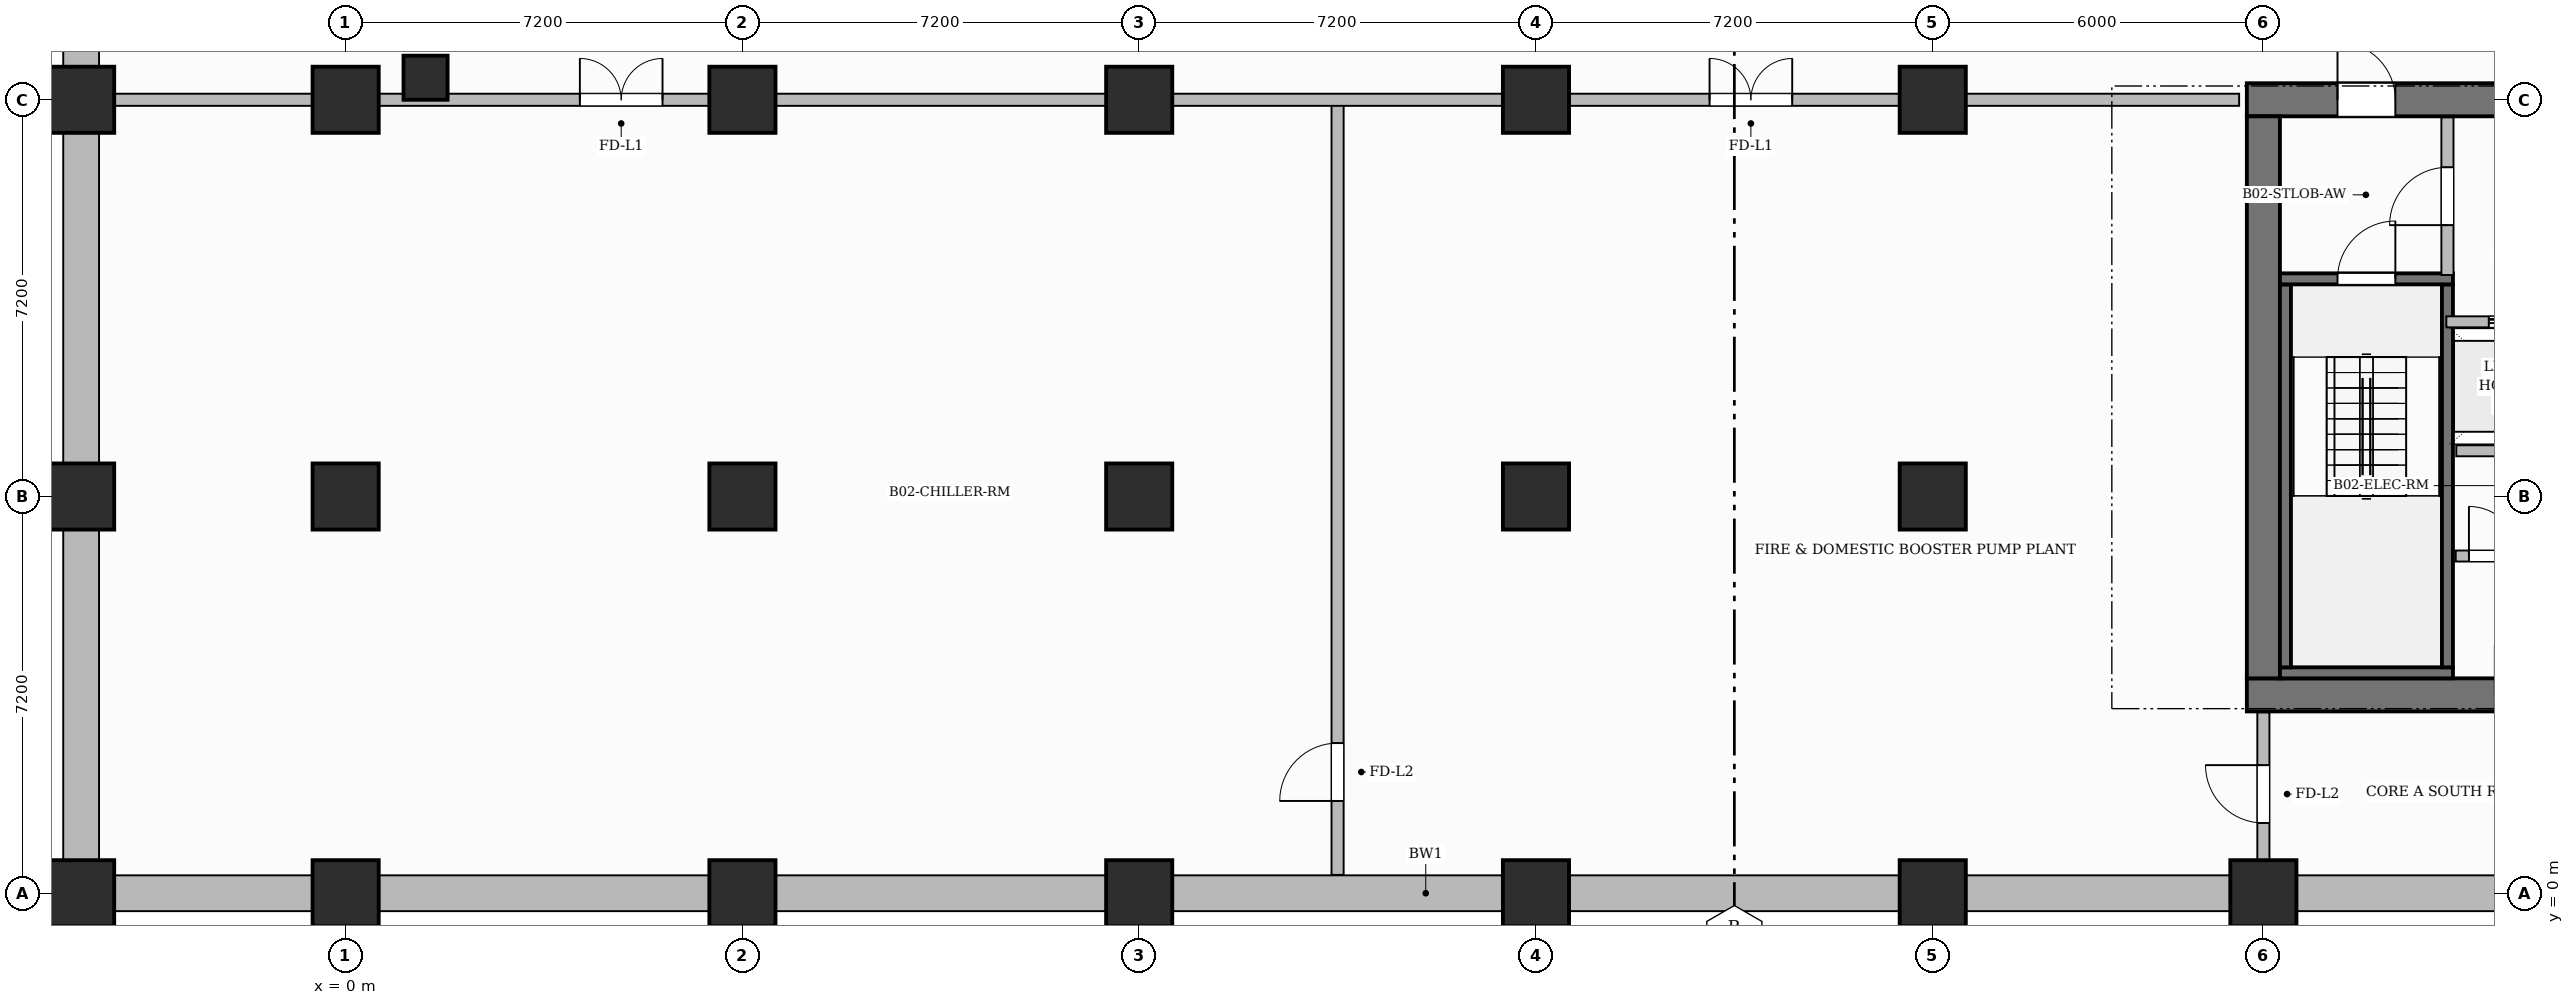
"""IFC4 building model, lengths in metres.
Left out: names, types, materials, properties, quantities, classifications, styles, units other than length and angle.
Written with IfcOpenShell. Run it as: python <this file> out.ifc"""

import sys

from ifc_helpers import new_model, si_unit, direction, frame, frame_2d, origin, origin_2d, place, context, subcontext, project, spatial, rectangle, extrude, source, transform, mapped, element, fill, save


model = new_model("IFC4")
c1 = context("Model", 3, precision=1e-05, world=origin(), true_north=direction((0.0, 1.0)))
c2 = subcontext(c1, "Body", "Model", "MODEL_VIEW")
j1 = project(units=[si_unit("LENGTHUNIT", "METRE"), si_unit("PLANEANGLEUNIT", "RADIAN")], contexts=[c1])
p1 = place(None, origin())
s1 = spatial("IfcSite", under=j1, at=p1, CompositionType="ELEMENT")
p2 = place(p1, origin())
s2 = spatial("IfcBuilding", under=s1, at=p2, CompositionType="ELEMENT")
p3 = place(p2, frame((0.0, 0.0, -13.0)))
s3 = spatial("IfcBuildingStorey", under=s2, at=p3, CompositionType="ELEMENT", Elevation=-13.0)
p4 = place(p3, frame((-4.8, 0.0, -0.4), z_axis=(0.0, 0.0, 1.0), x_axis=(1.0, 0.0, 0.0)))
e1 = element("IfcWall", 1, at=p4, inside=s3, PredefinedType="USERDEFINED", context=c2, shape_type="SweptSolid", body=[
    extrude(rectangle(XDim=85.2, YDim=0.65, at=frame_2d((42.6, 0.0))), origin(), (0.0, 0.0, 1.0), 6.9),
])
p5 = place(p3, frame((-4.8, 46.45, -0.4), z_axis=(0.0, 0.0, 1.0), x_axis=(0.0, -1.0, 0.0)))
e2 = element("IfcWall", 2, at=p5, inside=s3, PredefinedType="USERDEFINED", context=c2, shape_type="SweptSolid", body=[
    extrude(rectangle(XDim=46.1, YDim=0.65, at=frame_2d((23.05, 0.0))), origin(), (0.0, 0.0, 1.0), 6.9),
])
p6 = place(p3, frame((34.5, 3.6, -0.4), z_axis=(0.0, 0.0, 1.0), x_axis=(1.0, 0.0, 0.0)))
e3 = element("IfcWall", 3, at=p6, inside=s3, PredefinedType="SHEAR", context=c2, shape_type="SweptSolid", body=[
    extrude(rectangle(XDim=15.6, YDim=0.6, at=frame_2d((7.8, 0.0))), origin(), (0.0, 0.0, 1.0), 6.9),
])
p7 = place(p6, frame((4.5, 0.0, 0.4)))
e4 = element("IfcOpeningElement", 4, at=p7, cuts=e3, PredefinedType="OPENING", context=c2, shape_type="SweptSolid", body=[
    extrude(rectangle(XDim=0.9, YDim=2.1, at=frame_2d((0.45, 1.05))), frame((0.0, 0.31, 0.0), z_axis=(0.0, -1.0, 0.0), x_axis=(1.0, 0.0, 0.0)), (0.0, 0.0, 1.0), 0.62),
])
p8 = place(p6, frame((6.95, 0.0, 0.4)))
e5 = element("IfcOpeningElement", 5, at=p8, cuts=e3, PredefinedType="OPENING", context=c2, shape_type="SweptSolid", body=[
    extrude(rectangle(XDim=0.9, YDim=2.1, at=frame_2d((0.45, 1.05))), frame((0.0, 0.31, 0.0), z_axis=(0.0, -1.0, 0.0), x_axis=(1.0, 0.0, 0.0)), (0.0, 0.0, 1.0), 0.62),
])
p9 = place(p3, frame((34.5, 14.4, -0.4), z_axis=(0.0, 0.0, 1.0), x_axis=(1.0, 0.0, 0.0)))
e6 = element("IfcWall", 6, at=p9, inside=s3, PredefinedType="SHEAR", context=c2, shape_type="SweptSolid", body=[
    extrude(rectangle(XDim=15.6, YDim=0.6, at=frame_2d((7.8, 0.0))), origin(), (0.0, 0.0, 1.0), 6.9),
])
p10 = place(p9, frame((5.43, 0.0, 0.4)))
e7 = element("IfcOpeningElement", 7, at=p10, cuts=e6, PredefinedType="OPENING", context=c2, shape_type="SweptSolid", body=[
    extrude(rectangle(XDim=1.5, YDim=2.2, at=frame_2d((0.75, 1.1))), frame((0.0, 0.31, 0.0), z_axis=(0.0, -1.0, 0.0), x_axis=(1.0, 0.0, 0.0)), (0.0, 0.0, 1.0), 0.62),
])
p11 = place(p9, frame((1.645, 0.0, 0.4)))
e8 = element("IfcOpeningElement", 8, at=p11, cuts=e6, PredefinedType="OPENING", context=c2, shape_type="SweptSolid", body=[
    extrude(rectangle(XDim=1.05, YDim=2.15, at=frame_2d((0.525, 1.075))), frame((0.0, 0.31, 0.0), z_axis=(0.0, -1.0, 0.0), x_axis=(1.0, 0.0, 0.0)), (0.0, 0.0, 1.0), 0.62),
])
p12 = place(p9, frame((11.275, 0.0, 0.4)))
e9 = element("IfcOpeningElement", 9, at=p12, cuts=e6, PredefinedType="OPENING", context=c2, shape_type="SweptSolid", body=[
    extrude(rectangle(XDim=1.05, YDim=2.15, at=frame_2d((0.525, 1.075))), frame((0.0, 0.31, 0.0), z_axis=(0.0, -1.0, 0.0), x_axis=(1.0, 0.0, 0.0)), (0.0, 0.0, 1.0), 0.62),
])
p13 = place(p3, frame((34.8, 3.9, -0.4), z_axis=(0.0, 0.0, 1.0), x_axis=(0.0, 1.0, 0.0)))
e10 = element("IfcWall", 10, at=p13, inside=s3, PredefinedType="SHEAR", context=c2, shape_type="SweptSolid", body=[
    extrude(rectangle(XDim=10.2, YDim=0.6, at=frame_2d((5.1, 0.0))), origin(), (0.0, 0.0, 1.0), 6.9),
])
m1 = source(origin(), c2, "Body", "SweptSolid", [
    extrude(rectangle(XDim=1.2, YDim=1.2, at=origin_2d()), origin(), (0.0, 0.0, 1.0), 6.9),
])
for number, where, z_axis, x_axis in (
    (11, (-4.8, 0.0, -0.4), (0.0, 0.0, 1.0), (1.0, 0.0, 0.0)),
    (12, (-4.8, 7.2, -0.4), (0.0, 0.0, 1.0), (1.0, 0.0, 0.0)),
    (13, (-4.8, 14.4, -0.4), (0.0, 0.0, 1.0), (1.0, 0.0, 0.0)),
    (14, (0.0, 0.0, -0.4), (0.0, 0.0, 1.0), (1.0, 0.0, 0.0)),
    (15, (0.0, 7.2, -0.4), (0.0, 0.0, 1.0), (1.0, 0.0, 0.0)),
    (16, (0.0, 14.4, -0.4), (0.0, 0.0, 1.0), (1.0, 0.0, 0.0)),
    (17, (7.2, 0.0, -0.4), (0.0, 0.0, 1.0), (1.0, 0.0, 0.0)),
    (18, (7.2, 7.2, -0.4), (0.0, 0.0, 1.0), (1.0, 0.0, 0.0)),
    (19, (7.2, 14.4, -0.4), (0.0, 0.0, 1.0), (1.0, 0.0, 0.0)),
    (20, (14.4, 0.0, -0.4), (0.0, 0.0, 1.0), (1.0, 0.0, 0.0)),
    (21, (14.4, 7.2, -0.4), (0.0, 0.0, 1.0), (1.0, 0.0, 0.0)),
    (22, (14.4, 14.4, -0.4), (0.0, 0.0, 1.0), (1.0, 0.0, 0.0)),
    (23, (21.6, 0.0, -0.4), (0.0, 0.0, 1.0), (1.0, 0.0, 0.0)),
    (24, (21.6, 7.2, -0.4), (0.0, 0.0, 1.0), (1.0, 0.0, 0.0)),
    (25, (21.6, 14.4, -0.4), (0.0, 0.0, 1.0), (1.0, 0.0, 0.0)),
    (26, (28.8, 0.0, -0.4), (0.0, 0.0, 1.0), (1.0, 0.0, 0.0)),
    (27, (28.8, 7.2, -0.4), (0.0, 0.0, 1.0), (1.0, 0.0, 0.0)),
    (28, (28.8, 14.4, -0.4), (0.0, 0.0, 1.0), (1.0, 0.0, 0.0)),
    (29, (34.8, 0.0, -0.4), (0.0, 0.0, 1.0), (1.0, 0.0, 0.0)),
):
    element("IfcColumn", number, at=place(p3, frame(where, z_axis=z_axis, x_axis=x_axis)), inside=s3, PredefinedType="COLUMN", context=c2, shape_type="MappedRepresentation", body=[
        mapped(m1, transform((0.0, 0.0, 0.0), scale=1.0)),
    ])
m2 = source(origin(), c2, "Body", "SweptSolid", [
    extrude(rectangle(XDim=0.8, YDim=0.8, at=origin_2d()), origin(), (0.0, 0.0, 1.0), 6.9),
])
p14 = place(p3, frame((1.45, 14.8, -0.4), z_axis=(0.0, 0.0, 1.0), x_axis=(1.0, 0.0, 0.0)))
e30 = element("IfcColumn", 30, at=p14, inside=s3, PredefinedType="COLUMN", context=c2, shape_type="MappedRepresentation", body=[
    mapped(m2, transform((0.0, 0.0, 0.0), scale=1.0)),
])
p15 = place(p3, frame((35.1, 4.0, -0.4), z_axis=(0.0, 0.0, 1.0), x_axis=(1.0, 0.0, 0.0)))
e31 = element("IfcWall", 31, at=p15, inside=s3, PredefinedType="SHEAR", context=c2, shape_type="SweptSolid", body=[
    extrude(rectangle(XDim=3.14, YDim=0.2, at=frame_2d((1.57, 0.0))), origin(), (0.0, 0.0, 1.0), 6.9),
])
for number, where, z_axis, x_axis in (
    (32, (35.2, 4.1, -0.4), (0.0, 0.0, 1.0), (0.0, 1.0, 0.0)),
    (33, (38.14, 4.1, -0.4), (0.0, 0.0, 1.0), (0.0, 1.0, 0.0)),
):
    element("IfcWall", number, at=place(p3, frame(where, z_axis=z_axis, x_axis=x_axis)), inside=s3, PredefinedType="SHEAR", context=c2, shape_type="SweptSolid", body=[
        extrude(rectangle(XDim=6.95, YDim=0.2, at=frame_2d((3.475, 0.0))), origin(), (0.0, 0.0, 1.0), 6.9),
    ])
p16 = place(p3, frame((35.1, 11.15, -0.4), z_axis=(0.0, 0.0, 1.0), x_axis=(1.0, 0.0, 0.0)))
e34 = element("IfcWall", 34, at=p16, inside=s3, PredefinedType="SHEAR", context=c2, shape_type="SweptSolid", body=[
    extrude(rectangle(XDim=3.14, YDim=0.2, at=frame_2d((1.57, 0.0))), origin(), (0.0, 0.0, 1.0), 6.9),
])
p17 = place(p16, frame((1.045, 0.0, 0.4)))
e35 = element("IfcOpeningElement", 35, at=p17, cuts=e34, PredefinedType="OPENING", context=c2, shape_type="SweptSolid", body=[
    extrude(rectangle(XDim=1.05, YDim=2.2, at=frame_2d((0.525, 1.1))), frame((0.0, 0.11, 0.0), z_axis=(0.0, -1.0, 0.0), x_axis=(1.0, 0.0, 0.0)), (0.0, 0.0, 1.0), 0.22),
])
p18 = place(p3, frame((38.3, 8.03, 0.0), z_axis=(0.0, 0.0, 1.0), x_axis=(1.0, 0.0, 0.0)))
e36 = element("IfcWall", 36, at=p18, inside=s3, PredefinedType="PARTITIONING", context=c2, shape_type="SweptSolid", body=[
    extrude(rectangle(XDim=4.74, YDim=0.2, at=frame_2d((2.37, 0.0))), origin(), (0.0, 0.0, 1.0), 6.1),
])
p19 = place(p3, frame((38.14, 11.22, 0.0), z_axis=(0.0, 0.0, 1.0), x_axis=(0.0, 1.0, 0.0)))
e37 = element("IfcWall", 37, at=p19, inside=s3, PredefinedType="PARTITIONING", context=c2, shape_type="SweptSolid", body=[
    extrude(rectangle(XDim=2.86, YDim=0.22, at=frame_2d((1.43, 0.0))), origin(), (0.0, 0.0, 1.0), 6.1),
])
p20 = place(p19, frame((0.905, 0.0, 0.0)))
e38 = element("IfcOpeningElement", 38, at=p20, cuts=e37, PredefinedType="OPENING", context=c2, shape_type="SweptSolid", body=[
    extrude(rectangle(XDim=1.05, YDim=2.15, at=frame_2d((0.525, 1.075))), frame((0.0, 0.12, 0.0), z_axis=(0.0, -1.0, 0.0), x_axis=(1.0, 0.0, 0.0)), (0.0, 0.0, 1.0), 0.24),
])
p21 = place(p3, frame((38.29, 6.12, 0.0), z_axis=(0.0, 0.0, 1.0), x_axis=(1.0, 0.0, 0.0)))
e39 = element("IfcWall", 39, at=p21, inside=s3, PredefinedType="PARTITIONING", context=c2, shape_type="SweptSolid", body=[
    extrude(rectangle(XDim=1.38, YDim=0.2, at=frame_2d((0.69, 0.0))), origin(), (0.0, 0.0, 1.0), 6.1),
])
p22 = place(p21, frame((0.24, 0.0, 0.0)))
e40 = element("IfcOpeningElement", 40, at=p22, cuts=e39, PredefinedType="OPENING", context=c2, shape_type="SweptSolid", body=[
    extrude(rectangle(XDim=0.9, YDim=2.1, at=frame_2d((0.45, 1.05))), frame((0.0, 0.11, 0.0), z_axis=(0.0, -1.0, 0.0), x_axis=(1.0, 0.0, 0.0)), (0.0, 0.0, 1.0), 0.22),
])
p23 = place(p3, frame((18.0, 0.333, 0.0), z_axis=(0.0, 0.0, 1.0), x_axis=(0.0, 1.0, 0.0)))
e41 = element("IfcWall", 41, at=p23, inside=s3, PredefinedType="PARTITIONING", context=c2, shape_type="SweptSolid", body=[
    extrude(rectangle(XDim=13.977, YDim=0.22, at=frame_2d((6.989, 0.0))), origin(), (0.0, 0.0, 1.0), 5.335),
])
p24 = place(p23, frame((1.342, 0.0, 0.0)))
e42 = element("IfcOpeningElement", 42, at=p24, cuts=e41, PredefinedType="OPENING", context=c2, shape_type="SweptSolid", body=[
    extrude(rectangle(XDim=1.05, YDim=2.15, at=frame_2d((0.525, 1.075))), frame((0.0, 0.12, 0.0), z_axis=(0.0, -1.0, 0.0), x_axis=(1.0, 0.0, 0.0)), (0.0, 0.0, 1.0), 0.24),
])
p25 = place(p3, frame((-4.31, 14.4, 0.0), z_axis=(0.0, 0.0, 1.0), x_axis=(1.0, 0.0, 0.0)))
e43 = element("IfcWall", 43, at=p25, inside=s3, PredefinedType="PARTITIONING", context=c2, shape_type="SweptSolid", body=[
    extrude(rectangle(XDim=38.67, YDim=0.22, at=frame_2d((19.335, 0.0))), origin(), (0.0, 0.0, 1.0), 5.185),
])
p26 = place(p25, frame((8.56, 0.0, 0.0)))
e44 = element("IfcOpeningElement", 44, at=p26, cuts=e43, PredefinedType="OPENING", context=c2, shape_type="SweptSolid", body=[
    extrude(rectangle(XDim=1.5, YDim=2.2, at=frame_2d((0.75, 1.1))), frame((0.0, 0.12, 0.0), z_axis=(0.0, -1.0, 0.0), x_axis=(1.0, 0.0, 0.0)), (0.0, 0.0, 1.0), 0.24),
])
p27 = place(p25, frame((29.06, 0.0, 0.0)))
e45 = element("IfcOpeningElement", 45, at=p27, cuts=e43, PredefinedType="OPENING", context=c2, shape_type="SweptSolid", body=[
    extrude(rectangle(XDim=1.5, YDim=2.2, at=frame_2d((0.75, 1.1))), frame((0.0, 0.12, 0.0), z_axis=(0.0, -1.0, 0.0), x_axis=(1.0, 0.0, 0.0)), (0.0, 0.0, 1.0), 0.24),
])
p28 = place(p3, frame((34.8, 0.37, 0.0), z_axis=(0.0, 0.0, 1.0), x_axis=(0.0, 1.0, 0.0)))
e46 = element("IfcWall", 46, at=p28, inside=s3, PredefinedType="PARTITIONING", context=c2, shape_type="SweptSolid", body=[
    extrude(rectangle(XDim=2.91, YDim=0.22, at=frame_2d((1.455, 0.0))), origin(), (0.0, 0.0, 1.0), 6.1),
])
p29 = place(p28, frame((0.905, 0.0, 0.0)))
e47 = element("IfcOpeningElement", 47, at=p29, cuts=e46, PredefinedType="OPENING", context=c2, shape_type="SweptSolid", body=[
    extrude(rectangle(XDim=1.05, YDim=2.15, at=frame_2d((0.525, 1.075))), frame((0.0, 0.12, 0.0), z_axis=(0.0, -1.0, 0.0), x_axis=(1.0, 0.0, 0.0)), (0.0, 0.0, 1.0), 0.24),
])
p30 = place(p3, frame((38.12, 10.37, 0.0), z_axis=(0.0, 0.0, 1.0), x_axis=(1.0, 0.0, 0.0)))
e48 = element("IfcWall", 48, at=p30, inside=s3, PredefinedType="PARTITIONING", context=c2, shape_type="SweptSolid", body=[
    extrude(rectangle(XDim=2.64, YDim=0.2, at=frame_2d((1.32, 0.0))), origin(), (0.0, 0.0, 1.0), 6.1),
])
p31 = place(p30, frame((0.77, 0.0, 0.0)))
e49 = element("IfcOpeningElement", 49, at=p31, cuts=e48, PredefinedType="OPENING", context=c2, shape_type="SweptSolid", body=[
    extrude(rectangle(XDim=1.1, YDim=2.2, at=frame_2d((0.55, 1.1))), frame((0.0, 0.11, 0.0), z_axis=(0.0, -1.0, 0.0), x_axis=(1.0, 0.0, 0.0)), (0.0, 0.0, 1.0), 0.22),
])
m3 = source(origin(), c2, "Body", "SweptSolid", [
    extrude(rectangle(XDim=1.05, YDim=2.2, at=frame_2d((0.525, 1.1))), frame((0.0, 0.025, 0.0), z_axis=(0.0, -1.0, 0.0), x_axis=(1.0, 0.0, 0.0)), (0.0, 0.0, 1.0), 0.05),
])
p32 = place(p17, origin())
e50 = element("IfcDoor", 50, at=p32, inside=s3, OperationType="SINGLE_SWING_RIGHT", PredefinedType="DOOR", context=c2, shape_type="MappedRepresentation", body=[
    mapped(m3, transform((0.0, 0.0, 0.0), scale=1.0)),
])
fill(e35, e50)
m4 = source(origin(), c2, "Body", "SweptSolid", [
    extrude(rectangle(XDim=1.05, YDim=2.15, at=frame_2d((0.525, 1.075))), frame((0.0, 0.025, 0.0), z_axis=(0.0, -1.0, 0.0), x_axis=(1.0, 0.0, 0.0)), (0.0, 0.0, 1.0), 0.05),
])
p33 = place(p20, origin())
e51 = element("IfcDoor", 51, at=p33, inside=s3, OperationType="SINGLE_SWING_LEFT", PredefinedType="DOOR", context=c2, shape_type="MappedRepresentation", body=[
    mapped(m4, transform((0.0, 0.0, 0.0), scale=1.0)),
])
fill(e38, e51)
p34 = place(p11, origin())
e52 = element("IfcDoor", 52, at=p34, inside=s3, OperationType="SINGLE_SWING_LEFT", PredefinedType="DOOR", context=c2, shape_type="MappedRepresentation", body=[
    mapped(m4, transform((0.0, 0.0, 0.0), scale=1.0)),
])
fill(e8, e52)
m5 = source(origin(), c2, "Body", "SweptSolid", [
    extrude(rectangle(XDim=0.9, YDim=2.1, at=frame_2d((0.45, 1.05))), frame((0.0, 0.025, 0.0), z_axis=(0.0, -1.0, 0.0), x_axis=(1.0, 0.0, 0.0)), (0.0, 0.0, 1.0), 0.05),
])
p35 = place(p22, origin())
e53 = element("IfcDoor", 53, at=p35, inside=s3, OperationType="SINGLE_SWING_LEFT", PredefinedType="DOOR", context=c2, shape_type="MappedRepresentation", body=[
    mapped(m5, transform((0.0, 0.0, 0.0), scale=1.0)),
])
fill(e40, e53)
m6 = source(origin(), c2, "Body", "SweptSolid", [
    extrude(rectangle(XDim=1.5, YDim=2.2, at=frame_2d((0.75, 1.1))), frame((0.0, 0.025, 0.0), z_axis=(0.0, -1.0, 0.0), x_axis=(1.0, 0.0, 0.0)), (0.0, 0.0, 1.0), 0.05),
])
p36 = place(p26, origin())
e54 = element("IfcDoor", 54, at=p36, inside=s3, OperationType="DOUBLE_DOOR_SINGLE_SWING", PredefinedType="DOOR", context=c2, shape_type="MappedRepresentation", body=[
    mapped(m6, transform((0.0, 0.0, 0.0), scale=1.0)),
])
fill(e44, e54)
p37 = place(p27, origin())
e55 = element("IfcDoor", 55, at=p37, inside=s3, OperationType="DOUBLE_DOOR_SINGLE_SWING", PredefinedType="DOOR", context=c2, shape_type="MappedRepresentation", body=[
    mapped(m6, transform((0.0, 0.0, 0.0), scale=1.0)),
])
fill(e45, e55)
p38 = place(p24, origin())
e56 = element("IfcDoor", 56, at=p38, inside=s3, OperationType="SINGLE_SWING_LEFT", PredefinedType="DOOR", context=c2, shape_type="MappedRepresentation", body=[
    mapped(m4, transform((0.0, 0.0, 0.0), scale=1.0)),
])
fill(e42, e56)
p39 = place(p29, origin())
e57 = element("IfcDoor", 57, at=p39, inside=s3, OperationType="SINGLE_SWING_RIGHT", PredefinedType="DOOR", context=c2, shape_type="MappedRepresentation", body=[
    mapped(m4, transform((0.0, 0.0, 0.0), scale=1.0)),
])
fill(e47, e57)
m7 = source(origin(), c2, "Body", "SweptSolid", [
    extrude(rectangle(XDim=1.1, YDim=2.2, at=frame_2d((0.55, 1.1))), frame((0.0, 0.025, 0.0), z_axis=(0.0, -1.0, 0.0), x_axis=(1.0, 0.0, 0.0)), (0.0, 0.0, 1.0), 0.05),
])
p40 = place(p31, origin())
e58 = element("IfcDoor", 58, at=p40, inside=s3, OperationType="SLIDING_TO_LEFT", PredefinedType="DOOR", context=c2, shape_type="MappedRepresentation", body=[
    mapped(m7, transform((0.0, 0.0, 0.0), scale=1.0)),
])
fill(e49, e58)
save(model, sys.argv[1])
